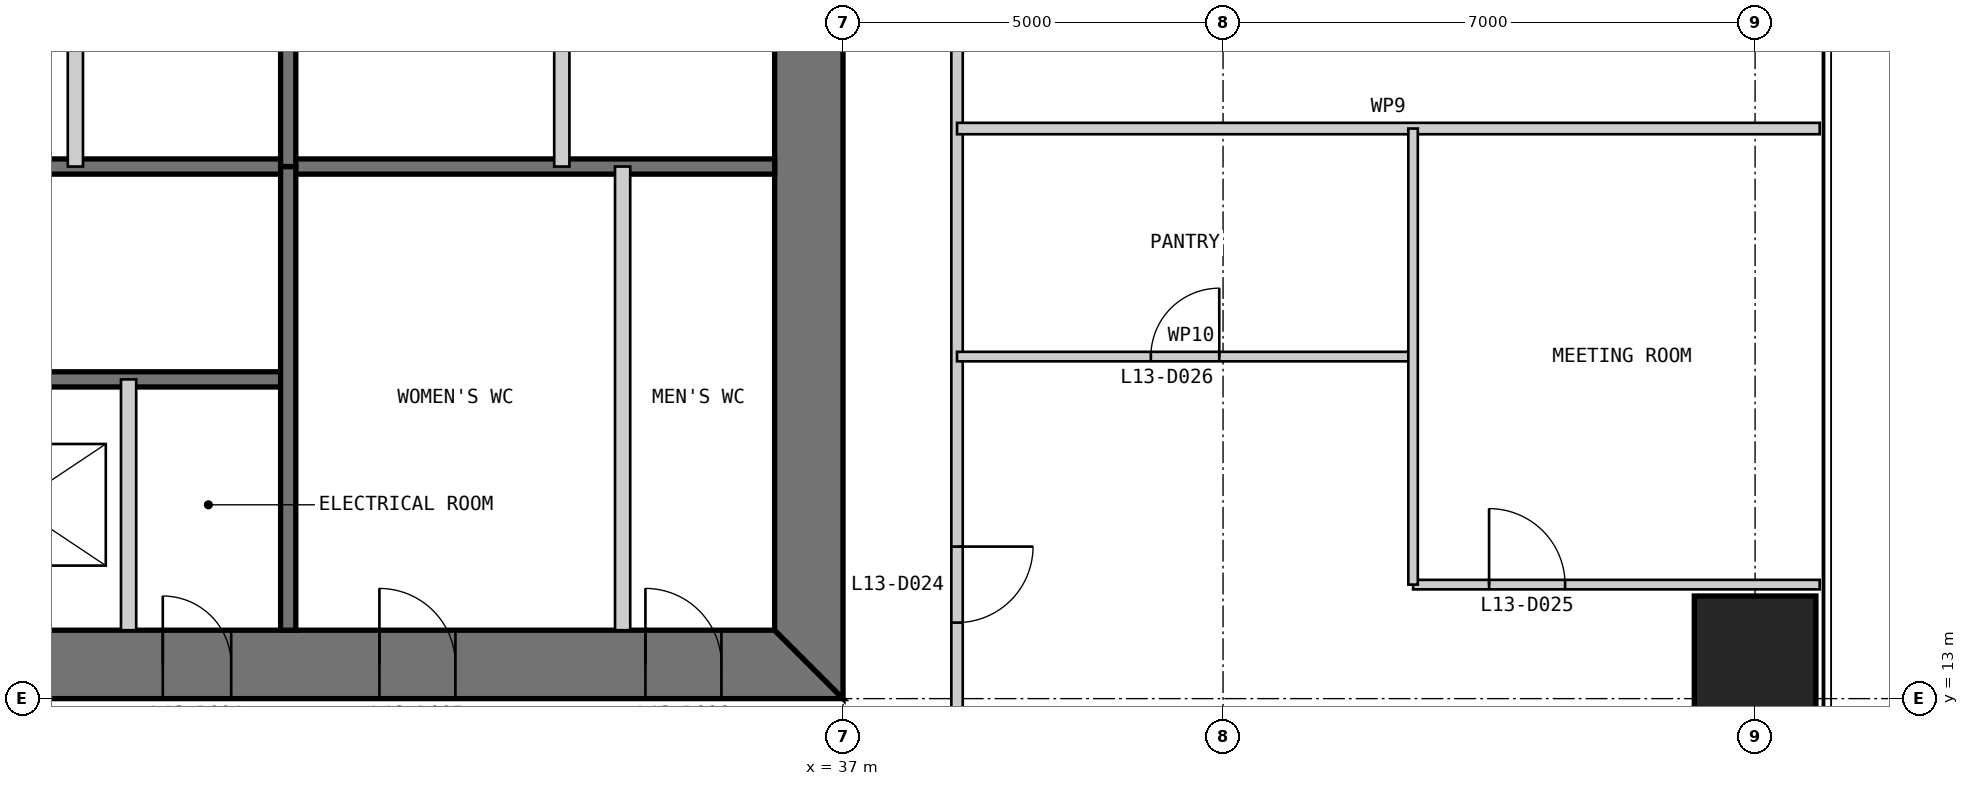
"""IFC4 building model, lengths in metres.
Left out: names, types, materials, properties, quantities, classifications, styles, units other than length and angle.
Written with IfcOpenShell. Run it as: python <this file> out.ifc"""

import sys

from ifc_helpers import new_model, si_unit, direction, frame, frame_2d, origin, origin_2d, place, context, subcontext, project, spatial, polyline, rectangle, outline, extrude, element, fill, save


model = new_model("IFC4")
c1 = context("Model", 3, precision=1e-05, world=origin(), true_north=direction((0.0, 1.0)))
c2 = subcontext(c1, "Body", "Model", "MODEL_VIEW")
j1 = project(units=[si_unit("LENGTHUNIT", "METRE"), si_unit("PLANEANGLEUNIT", "RADIAN")], contexts=[c1])
p1 = place(None, origin())
s1 = spatial("IfcSite", under=j1, at=p1, CompositionType="ELEMENT")
p2 = place(p1, origin())
s2 = spatial("IfcBuilding", under=s1, at=p2, CompositionType="ELEMENT")
p3 = place(p2, frame((0.0, 0.0, 59.0)))
s3 = spatial("IfcBuildingStorey", under=s2, at=p3, CompositionType="ELEMENT", Elevation=59.0)
p4 = place(p3, frame((49.0, 13.0, 0.0), z_axis=(0.0, 0.0, 1.0), x_axis=(1.0, 0.0, 0.0)))
e1 = element("IfcColumn", 1, at=p4, inside=s3, PredefinedType="COLUMN", context=c2, shape_type="SweptSolid", body=[
    extrude(rectangle(XDim=1.6, YDim=2.7, at=origin_2d()), origin(), (0.0, 0.0, 1.0), 4.0),
])
p5 = place(p3, frame((13.0, 13.45, 0.0), z_axis=(0.0, 0.0, 1.0), x_axis=(1.0, 0.0, 0.0)))
e2 = element("IfcWall", 2, at=p5, inside=s3, PredefinedType="SHEAR", context=c2, shape_type="SweptSolid", body=[
    extrude(outline(polyline([(0.0, -0.45), (24.0, -0.45), (23.1, 0.45), (0.9, 0.45), (0.0, -0.45)])), origin(), (0.0, 0.0, 1.0), 4.0),
])
p6 = place(p5, frame((4.9, 0.0, 0.0)))
e3 = element("IfcOpeningElement", 3, at=p6, cuts=e2, PredefinedType="OPENING", context=c2, shape_type="SweptSolid", body=[
    extrude(rectangle(XDim=1.0, YDim=2.2, at=frame_2d((0.5, 1.1))), frame((0.0, 0.46, 0.0), z_axis=(0.0, -1.0, 0.0), x_axis=(1.0, 0.0, 0.0)), (0.0, 0.0, 1.0), 0.92),
])
p7 = place(p5, frame((8.9, 0.0, 0.0)))
e4 = element("IfcOpeningElement", 4, at=p7, cuts=e2, PredefinedType="OPENING", context=c2, shape_type="SweptSolid", body=[
    extrude(rectangle(XDim=1.1, YDim=2.2, at=frame_2d((0.55, 1.1))), frame((0.0, 0.46, 0.0), z_axis=(0.0, -1.0, 0.0), x_axis=(1.0, 0.0, 0.0)), (0.0, 0.0, 1.0), 0.92),
])
p8 = place(p5, frame((15.05, 0.0, 0.0)))
e5 = element("IfcOpeningElement", 5, at=p8, cuts=e2, PredefinedType="OPENING", context=c2, shape_type="SweptSolid", body=[
    extrude(rectangle(XDim=0.9, YDim=2.2, at=frame_2d((0.45, 1.1))), frame((0.0, 0.46, 0.0), z_axis=(0.0, -1.0, 0.0), x_axis=(1.0, 0.0, 0.0)), (0.0, 0.0, 1.0), 0.92),
])
p9 = place(p5, frame((17.9, 0.0, 0.0)))
e6 = element("IfcOpeningElement", 6, at=p9, cuts=e2, PredefinedType="OPENING", context=c2, shape_type="SweptSolid", body=[
    extrude(rectangle(XDim=1.0, YDim=2.2, at=frame_2d((0.5, 1.1))), frame((0.0, 0.46, 0.0), z_axis=(0.0, -1.0, 0.0), x_axis=(1.0, 0.0, 0.0)), (0.0, 0.0, 1.0), 0.92),
])
p10 = place(p5, frame((21.4, 0.0, 0.0)))
e7 = element("IfcOpeningElement", 7, at=p10, cuts=e2, PredefinedType="OPENING", context=c2, shape_type="SweptSolid", body=[
    extrude(rectangle(XDim=1.0, YDim=2.2, at=frame_2d((0.5, 1.1))), frame((0.0, 0.46, 0.0), z_axis=(0.0, -1.0, 0.0), x_axis=(1.0, 0.0, 0.0)), (0.0, 0.0, 1.0), 0.92),
])
p11 = place(p3, frame((36.55, 13.9, 0.0), z_axis=(0.0, 0.0, 1.0), x_axis=(0.0, 1.0, 0.0)))
e8 = element("IfcWall", 8, at=p11, inside=s3, PredefinedType="SHEAR", context=c2, shape_type="SweptSolid", body=[
    extrude(outline(polyline([(-0.9, -0.45), (23.1, -0.45), (22.2, 0.45), (0.0, 0.45), (-0.9, -0.45)])), origin(), (0.0, 0.0, 1.0), 4.0),
])
p12 = place(p11, frame((20.2, 0.0, 0.0)))
e9 = element("IfcOpeningElement", 9, at=p12, cuts=e8, PredefinedType="OPENING", context=c2, shape_type="SweptSolid", body=[
    extrude(rectangle(XDim=1.0, YDim=2.2, at=frame_2d((0.5, 1.1))), frame((0.0, 0.46, 0.0), z_axis=(0.0, -1.0, 0.0), x_axis=(1.0, 0.0, 0.0)), (0.0, 0.0, 1.0), 0.92),
])
p13 = place(p11, frame((17.25, 0.0, 0.0)))
e10 = element("IfcOpeningElement", 10, at=p13, cuts=e8, PredefinedType="OPENING", context=c2, shape_type="SweptSolid", body=[
    extrude(rectangle(XDim=0.9, YDim=2.2, at=frame_2d((0.45, 1.1))), frame((0.0, 0.46, 0.0), z_axis=(0.0, -1.0, 0.0), x_axis=(1.0, 0.0, 0.0)), (0.0, 0.0, 1.0), 0.92),
])
p14 = place(p3, frame((20.3, 17.2, 0.0), z_axis=(0.0, 0.0, 1.0), x_axis=(1.0, 0.0, 0.0)))
e11 = element("IfcWall", 11, at=p14, inside=s3, PredefinedType="SOLIDWALL", context=c2, shape_type="SweptSolid", body=[
    extrude(rectangle(XDim=9.4, YDim=0.2, at=frame_2d((4.7, 0.0))), origin(), (0.0, 0.0, 1.0), 3.8),
])
p15 = place(p14, frame((0.25, 0.0, 0.0)))
e12 = element("IfcOpeningElement", 12, at=p15, cuts=e11, PredefinedType="OPENING", context=c2, shape_type="SweptSolid", body=[
    extrude(rectangle(XDim=1.0, YDim=2.2, at=frame_2d((0.5, 1.1))), frame((0.0, 0.11, 0.0), z_axis=(0.0, -1.0, 0.0), x_axis=(1.0, 0.0, 0.0)), (0.0, 0.0, 1.0), 0.22),
])
p16 = place(p3, frame((20.3, 20.0, 0.0), z_axis=(0.0, 0.0, 1.0), x_axis=(1.0, 0.0, 0.0)))
e13 = element("IfcWall", 13, at=p16, inside=s3, PredefinedType="SOLIDWALL", context=c2, shape_type="SweptSolid", body=[
    extrude(rectangle(XDim=15.8, YDim=0.2, at=frame_2d((7.9, 0.0))), origin(), (0.0, 0.0, 1.0), 3.8),
])
p17 = place(p3, frame((27.6, 13.9, 0.0), z_axis=(0.0, 0.0, 1.0), x_axis=(0.0, 1.0, 0.0)))
e14 = element("IfcWall", 14, at=p17, inside=s3, PredefinedType="PARTITIONING", context=c2, shape_type="SweptSolid", body=[
    extrude(rectangle(XDim=3.3, YDim=0.2, at=frame_2d((1.65, 0.0))), origin(), (0.0, 0.0, 1.0), 3.8),
])
p18 = place(p3, frame((29.7, 13.9, 0.0), z_axis=(0.0, 0.0, 1.0), x_axis=(0.0, 1.0, 0.0)))
e15 = element("IfcWall", 15, at=p18, inside=s3, PredefinedType="SOLIDWALL", context=c2, shape_type="SweptSolid", body=[
    extrude(rectangle(XDim=6.1, YDim=0.2, at=frame_2d((3.05, 0.0))), origin(), (0.0, 0.0, 1.0), 3.8),
])
p19 = place(p3, frame((34.1, 13.9, 0.0), z_axis=(0.0, 0.0, 1.0), x_axis=(0.0, 1.0, 0.0)))
e16 = element("IfcWall", 16, at=p19, inside=s3, PredefinedType="PARTITIONING", context=c2, shape_type="SweptSolid", body=[
    extrude(rectangle(XDim=6.1, YDim=0.2, at=frame_2d((3.05, 0.0))), origin(), (0.0, 0.0, 1.0), 3.8),
])
p20 = place(p3, frame((33.3, 36.1, 0.0), z_axis=(0.0, 0.0, 1.0), x_axis=(0.0, -1.0, 0.0)))
e17 = element("IfcWall", 17, at=p20, inside=s3, PredefinedType="PARTITIONING", context=c2, shape_type="SweptSolid", body=[
    extrude(rectangle(XDim=16.1, YDim=0.2, at=frame_2d((8.05, 0.0))), origin(), (0.0, 0.0, 1.0), 3.8),
])
p21 = place(p20, frame((3.8, 0.0, 0.0)))
e18 = element("IfcOpeningElement", 18, at=p21, cuts=e17, PredefinedType="OPENING", context=c2, shape_type="SweptSolid", body=[
    extrude(rectangle(XDim=0.9, YDim=2.2, at=frame_2d((0.45, 1.1))), frame((0.0, 0.11, 0.0), z_axis=(0.0, -1.0, 0.0), x_axis=(1.0, 0.0, 0.0)), (0.0, 0.0, 1.0), 0.22),
])
p22 = place(p3, frame((29.7, 36.1, 0.0), z_axis=(0.0, 0.0, 1.0), x_axis=(0.0, -1.0, 0.0)))
e19 = element("IfcWall", 19, at=p22, inside=s3, PredefinedType="SOLIDWALL", context=c2, shape_type="SweptSolid", body=[
    extrude(rectangle(XDim=16.1, YDim=0.2, at=frame_2d((8.05, 0.0))), origin(), (0.0, 0.0, 1.0), 3.8),
])
p23 = place(p3, frame((26.9, 30.0, 0.0), z_axis=(0.0, 0.0, 1.0), x_axis=(0.0, -1.0, 0.0)))
e20 = element("IfcWall", 20, at=p23, inside=s3, PredefinedType="PARTITIONING", context=c2, shape_type="SweptSolid", body=[
    extrude(rectangle(XDim=10.0, YDim=0.2, at=frame_2d((5.0, 0.0))), origin(), (0.0, 0.0, 1.0), 3.8),
])
p24 = place(p3, frame((38.5, 11.5, 0.0), z_axis=(0.0, 0.0, 1.0), x_axis=(0.0, 1.0, 0.0)))
e21 = element("IfcWall", 21, at=p24, inside=s3, PredefinedType="PARTITIONING", context=c2, shape_type="SweptSolid", body=[
    extrude(rectangle(XDim=27.0, YDim=0.15, at=frame_2d((13.5, 0.0))), origin(), (0.0, 0.0, 1.0), 3.85),
])
p25 = place(p24, frame((2.5, 0.0, 0.0)))
e22 = element("IfcOpeningElement", 22, at=p25, cuts=e21, PredefinedType="OPENING", context=c2, shape_type="SweptSolid", body=[
    extrude(rectangle(XDim=1.0, YDim=2.2, at=frame_2d((0.5, 1.1))), frame((0.0, 0.085, 0.0), z_axis=(0.0, -1.0, 0.0), x_axis=(1.0, 0.0, 0.0)), (0.0, 0.0, 1.0), 0.17),
])
p26 = place(p24, frame((13.0, 0.0, 0.0)))
e23 = element("IfcOpeningElement", 23, at=p26, cuts=e21, PredefinedType="OPENING", context=c2, shape_type="SweptSolid", body=[
    extrude(rectangle(XDim=1.0, YDim=2.2, at=frame_2d((0.5, 1.1))), frame((0.0, 0.085, 0.0), z_axis=(0.0, -1.0, 0.0), x_axis=(1.0, 0.0, 0.0)), (0.0, 0.0, 1.0), 0.17),
])
p27 = place(p24, frame((23.5, 0.0, 0.0)))
e24 = element("IfcOpeningElement", 24, at=p27, cuts=e21, PredefinedType="OPENING", context=c2, shape_type="SweptSolid", body=[
    extrude(rectangle(XDim=1.0, YDim=2.2, at=frame_2d((0.5, 1.1))), frame((0.0, 0.085, 0.0), z_axis=(0.0, -1.0, 0.0), x_axis=(1.0, 0.0, 0.0)), (0.0, 0.0, 1.0), 0.17),
])
p28 = place(p3, frame((49.85, 14.5, 0.0), z_axis=(0.0, 0.0, 1.0), x_axis=(-1.0, 0.0, 0.0)))
e25 = element("IfcWall", 25, at=p28, inside=s3, PredefinedType="PARTITIONING", context=c2, shape_type="SweptSolid", body=[
    extrude(rectangle(XDim=5.35, YDim=0.125, at=frame_2d((2.675, 0.0))), origin(), (0.0, 0.0, 1.0), 3.85),
])
p29 = place(p28, frame((3.35, 0.0, 0.0)))
e26 = element("IfcOpeningElement", 26, at=p29, cuts=e25, PredefinedType="OPENING", context=c2, shape_type="SweptSolid", body=[
    extrude(rectangle(XDim=1.0, YDim=2.2, at=frame_2d((0.5, 1.1))), frame((0.0, 0.073, 0.0), z_axis=(0.0, -1.0, 0.0), x_axis=(1.0, 0.0, 0.0)), (0.0, 0.0, 1.0), 0.145),
])
p30 = place(p3, frame((44.5, 17.5, 0.0), z_axis=(0.0, 0.0, 1.0), x_axis=(-1.0, 0.0, 0.0)))
e27 = element("IfcWall", 27, at=p30, inside=s3, PredefinedType="PARTITIONING", context=c2, shape_type="SweptSolid", body=[
    extrude(rectangle(XDim=6.0, YDim=0.125, at=frame_2d((3.0, 0.0))), origin(), (0.0, 0.0, 1.0), 3.85),
])
p31 = place(p30, frame((2.55, 0.0, 0.0)))
e28 = element("IfcOpeningElement", 28, at=p31, cuts=e27, PredefinedType="OPENING", context=c2, shape_type="SweptSolid", body=[
    extrude(rectangle(XDim=0.9, YDim=2.2, at=frame_2d((0.45, 1.1))), frame((0.0, 0.073, 0.0), z_axis=(0.0, -1.0, 0.0), x_axis=(1.0, 0.0, 0.0)), (0.0, 0.0, 1.0), 0.145),
])
p32 = place(p3, frame((49.85, 20.5, 0.0), z_axis=(0.0, 0.0, 1.0), x_axis=(-1.0, 0.0, 0.0)))
e29 = element("IfcWall", 29, at=p32, inside=s3, PredefinedType="PARTITIONING", context=c2, shape_type="SweptSolid", body=[
    extrude(rectangle(XDim=11.35, YDim=0.15, at=frame_2d((5.675, 0.0))), origin(), (0.0, 0.0, 1.0), 3.85),
])
p33 = place(p3, frame((44.5, 14.5, 0.0), z_axis=(0.0, 0.0, 1.0), x_axis=(0.0, 1.0, 0.0)))
e30 = element("IfcWall", 30, at=p33, inside=s3, PredefinedType="PARTITIONING", context=c2, shape_type="SweptSolid", body=[
    extrude(rectangle(XDim=6.0, YDim=0.125, at=frame_2d((3.0, 0.0))), origin(), (0.0, 0.0, 1.0), 3.85),
])
p34 = place(p8, origin())
e31 = element("IfcDoor", 31, at=p34, inside=s3, OperationType="SINGLE_SWING_LEFT", PredefinedType="DOOR", context=c2, shape_type="SweptSolid", body=[
    extrude(rectangle(XDim=0.9, YDim=2.2, at=frame_2d((0.45, 1.1))), frame((0.0, 0.025, 0.0), z_axis=(0.0, -1.0, 0.0), x_axis=(1.0, 0.0, 0.0)), (0.0, 0.0, 1.0), 0.05),
    extrude(outline(polyline([(0.0, 0.0), (0.04, 0.0), (0.04, 2.16), (0.86, 2.16), (0.86, 0.0), (0.9, 0.0), (0.9, 2.2), (0.0, 2.2), (0.0, 0.0)])), frame((0.0, 0.3, 0.0), z_axis=(0.0, -1.0, 0.0), x_axis=(1.0, 0.0, 0.0)), (0.0, 0.0, 1.0), 0.6),
])
fill(e5, e31)
p35 = place(p9, origin())
e32 = element("IfcDoor", 32, at=p35, inside=s3, OperationType="SINGLE_SWING_LEFT", PredefinedType="DOOR", context=c2, shape_type="SweptSolid", body=[
    extrude(rectangle(XDim=1.0, YDim=2.2, at=frame_2d((0.5, 1.1))), frame((0.0, 0.025, 0.0), z_axis=(0.0, -1.0, 0.0), x_axis=(1.0, 0.0, 0.0)), (0.0, 0.0, 1.0), 0.05),
    extrude(outline(polyline([(0.0, 0.0), (0.04, 0.0), (0.04, 2.16), (0.96, 2.16), (0.96, 0.0), (1.0, 0.0), (1.0, 2.2), (0.0, 2.2), (0.0, 0.0)])), frame((0.0, 0.3, 0.0), z_axis=(0.0, -1.0, 0.0), x_axis=(1.0, 0.0, 0.0)), (0.0, 0.0, 1.0), 0.6),
])
fill(e6, e32)
p36 = place(p10, origin())
e33 = element("IfcDoor", 33, at=p36, inside=s3, OperationType="SINGLE_SWING_LEFT", PredefinedType="DOOR", context=c2, shape_type="SweptSolid", body=[
    extrude(rectangle(XDim=1.0, YDim=2.2, at=frame_2d((0.5, 1.1))), frame((0.0, 0.025, 0.0), z_axis=(0.0, -1.0, 0.0), x_axis=(1.0, 0.0, 0.0)), (0.0, 0.0, 1.0), 0.05),
    extrude(outline(polyline([(0.0, 0.0), (0.04, 0.0), (0.04, 2.16), (0.96, 2.16), (0.96, 0.0), (1.0, 0.0), (1.0, 2.2), (0.0, 2.2), (0.0, 0.0)])), frame((0.0, 0.3, 0.0), z_axis=(0.0, -1.0, 0.0), x_axis=(1.0, 0.0, 0.0)), (0.0, 0.0, 1.0), 0.6),
])
fill(e7, e33)
p37 = place(p25, frame((1.0, 0.0, 0.0), z_axis=(0.0, 0.0, 1.0), x_axis=(-1.0, 0.0, 0.0)))
e34 = element("IfcDoor", 34, at=p37, inside=s3, OperationType="SINGLE_SWING_LEFT", PredefinedType="DOOR", context=c2, shape_type="SweptSolid", body=[
    extrude(rectangle(XDim=1.0, YDim=2.2, at=frame_2d((0.5, 1.1))), frame((0.0, 0.025, 0.0), z_axis=(0.0, -1.0, 0.0), x_axis=(1.0, 0.0, 0.0)), (0.0, 0.0, 1.0), 0.05),
])
fill(e22, e34)
p38 = place(p29, frame((1.0, 0.0, 0.0), z_axis=(0.0, 0.0, 1.0), x_axis=(-1.0, 0.0, 0.0)))
e35 = element("IfcDoor", 35, at=p38, inside=s3, OperationType="SINGLE_SWING_LEFT", PredefinedType="DOOR", context=c2, shape_type="SweptSolid", body=[
    extrude(rectangle(XDim=1.0, YDim=2.2, at=frame_2d((0.5, 1.1))), frame((0.0, 0.025, 0.0), z_axis=(0.0, -1.0, 0.0), x_axis=(1.0, 0.0, 0.0)), (0.0, 0.0, 1.0), 0.05),
])
fill(e26, e35)
p39 = place(p31, frame((0.9, 0.0, 0.0), z_axis=(0.0, 0.0, 1.0), x_axis=(-1.0, 0.0, 0.0)))
e36 = element("IfcDoor", 36, at=p39, inside=s3, OperationType="SINGLE_SWING_RIGHT", PredefinedType="DOOR", context=c2, shape_type="SweptSolid", body=[
    extrude(rectangle(XDim=0.9, YDim=2.2, at=frame_2d((0.45, 1.1))), frame((0.0, 0.025, 0.0), z_axis=(0.0, -1.0, 0.0), x_axis=(1.0, 0.0, 0.0)), (0.0, 0.0, 1.0), 0.05),
])
fill(e28, e36)
save(model, sys.argv[1])
